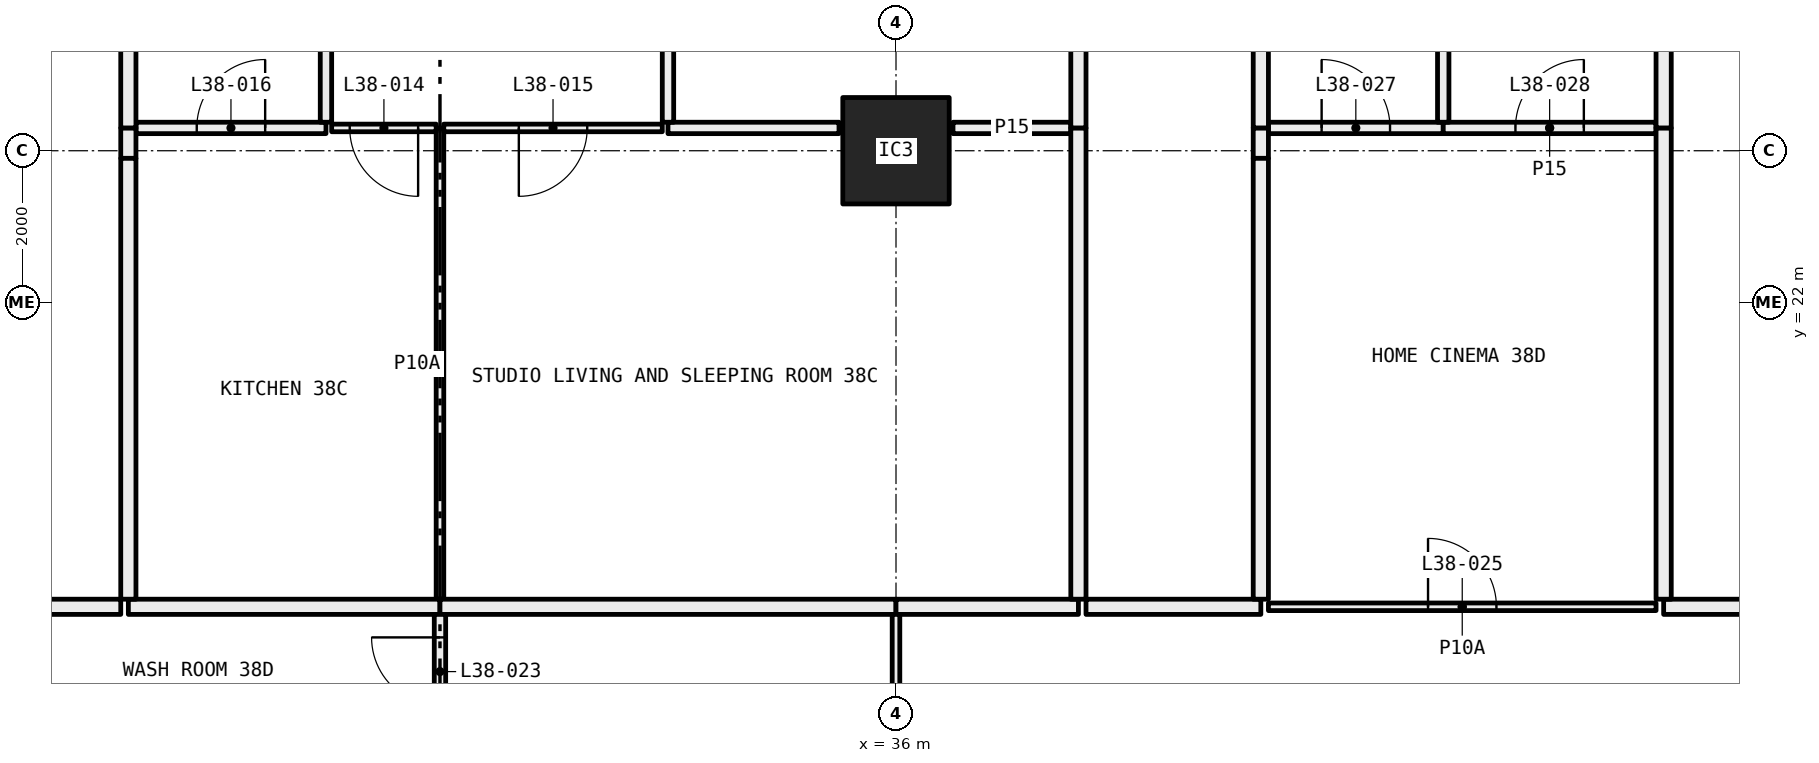
"""IFC4 building model, lengths in metres.
Left out: names, types, materials, properties, quantities, classifications, styles, units other than length and angle.
Written with IfcOpenShell. Run it as: python <this file> out.ifc"""

import sys

from ifc_helpers import new_model, si_unit, direction, frame, frame_2d, origin, origin_2d, place, context, subcontext, project, spatial, rectangle, hollow_rectangle, extrude, element, fill, save


model = new_model("IFC4")
c1 = context("Model", 3, precision=1e-05, world=origin(), true_north=direction((0.0, 1.0)))
c2 = subcontext(c1, "Body", "Model", "MODEL_VIEW")
j1 = project(units=[si_unit("LENGTHUNIT", "METRE"), si_unit("PLANEANGLEUNIT", "RADIAN")], contexts=[c1])
p1 = place(None, origin())
s1 = spatial("IfcSite", under=j1, at=p1, CompositionType="ELEMENT")
p2 = place(p1, origin())
s2 = spatial("IfcBuilding", under=s1, at=p2, CompositionType="ELEMENT")
p3 = place(p2, frame((0.0, 0.0, 144.9)))
s3 = spatial("IfcBuildingStorey", under=s2, at=p3, CompositionType="ELEMENT", Elevation=144.9)
p4 = place(p3, frame((36.0, 24.0, 0.0), z_axis=(0.0, 0.0, 1.0), x_axis=(1.0, 0.0, 0.0)))
e1 = element("IfcColumn", 1, at=p4, inside=s3, PredefinedType="COLUMN", context=c2, shape_type="SweptSolid", body=[
    extrude(hollow_rectangle(XDim=1.4, YDim=1.4, WallThickness=0.06, at=origin_2d()), origin(), (0.0, 0.0, 1.0), 3.05),
])
p5 = place(p3, frame((30.0, 18.1, 0.0), z_axis=(0.0, 0.0, 1.0), x_axis=(0.0, 1.0, 0.0)))
e2 = element("IfcWall", 2, at=p5, inside=s3, PredefinedType="PARTITIONING", context=c2, shape_type="SweptSolid", body=[
    extrude(rectangle(XDim=6.2, YDim=0.1, at=frame_2d((3.1, 0.0))), origin(), (0.0, 0.0, 1.0), 2.45),
])
p6 = place(p3, frame((28.5, 24.3, 0.0), z_axis=(0.0, 0.0, 1.0), x_axis=(-1.0, 0.0, 0.0)))
e3 = element("IfcWall", 3, at=p6, inside=s3, PredefinedType="PARTITIONING", context=c2, shape_type="SweptSolid", body=[
    extrude(rectangle(XDim=2.5, YDim=0.15, at=frame_2d((1.25, 0.0))), origin(), (0.0, 0.0, 1.0), 3.05),
])
p7 = place(p6, frame((0.8, 0.0, 0.0)))
e4 = element("IfcOpeningElement", 4, at=p7, cuts=e3, PredefinedType="OPENING", context=c2, shape_type="SweptSolid", body=[
    extrude(rectangle(XDim=0.9, YDim=2.1, at=frame_2d((0.45, 1.05))), frame((0.0, 0.085, 0.0), z_axis=(0.0, -1.0, 0.0), x_axis=(1.0, 0.0, 0.0)), (0.0, 0.0, 1.0), 0.17),
])
p8 = place(p3, frame((29.95, 24.3, 0.0), z_axis=(0.0, 0.0, 1.0), x_axis=(-1.0, 0.0, 0.0)))
e5 = element("IfcWall", 5, at=p8, inside=s3, PredefinedType="PARTITIONING", context=c2, shape_type="SweptSolid", body=[
    extrude(rectangle(XDim=1.375, YDim=0.1, at=frame_2d((0.688, 0.0))), origin(), (0.0, 0.0, 1.0), 3.05),
])
p9 = place(p8, frame((0.238, 0.0, 0.0)))
e6 = element("IfcOpeningElement", 6, at=p9, cuts=e5, PredefinedType="OPENING", context=c2, shape_type="SweptSolid", body=[
    extrude(rectangle(XDim=0.9, YDim=2.1, at=frame_2d((0.45, 1.05))), frame((0.0, 0.06, 0.0), z_axis=(0.0, -1.0, 0.0), x_axis=(1.0, 0.0, 0.0)), (0.0, 0.0, 1.0), 0.12),
])
p10 = place(p3, frame((25.9, 18.0, 0.0), z_axis=(0.0, 0.0, 1.0), x_axis=(1.0, 0.0, 0.0)))
e7 = element("IfcWall", 7, at=p10, inside=s3, PredefinedType="PARTITIONING", context=c2, shape_type="SweptSolid", body=[
    extrude(rectangle(XDim=4.1, YDim=0.2, at=frame_2d((2.05, 0.0))), origin(), (0.0, 0.0, 1.0), 3.05),
])
p11 = place(p3, frame((25.9, 24.3, 0.0), z_axis=(0.0, 0.0, 1.0), x_axis=(0.0, -1.0, 0.0)))
e8 = element("IfcWall", 8, at=p11, inside=s3, PredefinedType="PARTITIONING", context=c2, shape_type="SweptSolid", body=[
    extrude(rectangle(XDim=0.4, YDim=0.2, at=frame_2d((0.2, 0.0))), origin(), (0.0, 0.0, 1.0), 2.45),
])
p12 = place(p3, frame((25.9, 23.9, 0.0), z_axis=(0.0, 0.0, 1.0), x_axis=(0.0, -1.0, 0.0)))
e9 = element("IfcWall", 9, at=p12, inside=s3, PredefinedType="PARTITIONING", context=c2, shape_type="SweptSolid", body=[
    extrude(rectangle(XDim=5.8, YDim=0.2, at=frame_2d((2.9, 0.0))), origin(), (0.0, 0.0, 1.0), 3.05),
])
p13 = place(p3, frame((32.925, 24.3, 0.0), z_axis=(0.0, 0.0, 1.0), x_axis=(-1.0, 0.0, 0.0)))
e10 = element("IfcWall", 10, at=p13, inside=s3, PredefinedType="PARTITIONING", context=c2, shape_type="SweptSolid", body=[
    extrude(rectangle(XDim=2.875, YDim=0.1, at=frame_2d((1.438, 0.0))), origin(), (0.0, 0.0, 1.0), 3.05),
])
p14 = place(p13, frame((0.988, 0.0, 0.0)))
e11 = element("IfcOpeningElement", 11, at=p14, cuts=e10, PredefinedType="OPENING", context=c2, shape_type="SweptSolid", body=[
    extrude(rectangle(XDim=0.9, YDim=2.1, at=frame_2d((0.45, 1.05))), frame((0.0, 0.06, 0.0), z_axis=(0.0, -1.0, 0.0), x_axis=(1.0, 0.0, 0.0)), (0.0, 0.0, 1.0), 0.12),
])
p15 = place(p3, frame((35.25, 24.3, 0.0), z_axis=(0.0, 0.0, 1.0), x_axis=(-1.0, 0.0, 0.0)))
e12 = element("IfcWall", 12, at=p15, inside=s3, PredefinedType="PARTITIONING", context=c2, shape_type="SweptSolid", body=[
    extrude(rectangle(XDim=2.25, YDim=0.15, at=frame_2d((1.125, 0.0))), origin(), (0.0, 0.0, 1.0), 3.05),
])
p16 = place(p3, frame((38.3, 24.3, 0.0), z_axis=(0.0, 0.0, 1.0), x_axis=(-1.0, 0.0, 0.0)))
e13 = element("IfcWall", 13, at=p16, inside=s3, PredefinedType="PARTITIONING", context=c2, shape_type="SweptSolid", body=[
    extrude(rectangle(XDim=1.55, YDim=0.15, at=frame_2d((0.775, 0.0))), origin(), (0.0, 0.0, 1.0), 3.05),
])
p17 = place(p3, frame((30.0, 18.0, 0.0), z_axis=(0.0, 0.0, 1.0), x_axis=(1.0, 0.0, 0.0)))
e14 = element("IfcWall", 14, at=p17, inside=s3, PredefinedType="PARTITIONING", context=c2, shape_type="SweptSolid", body=[
    extrude(rectangle(XDim=6.0, YDim=0.2, at=frame_2d((3.0, 0.0))), origin(), (0.0, 0.0, 1.0), 2.45),
])
p18 = place(p3, frame((36.0, 18.0, 0.0), z_axis=(0.0, 0.0, 1.0), x_axis=(1.0, 0.0, 0.0)))
e15 = element("IfcWall", 15, at=p18, inside=s3, PredefinedType="PARTITIONING", context=c2, shape_type="SweptSolid", body=[
    extrude(rectangle(XDim=2.4, YDim=0.2, at=frame_2d((1.2, 0.0))), origin(), (0.0, 0.0, 1.0), 2.45),
])
p19 = place(p3, frame((38.4, 18.1, 0.0), z_axis=(0.0, 0.0, 1.0), x_axis=(0.0, 1.0, 0.0)))
e16 = element("IfcWall", 16, at=p19, inside=s3, PredefinedType="PARTITIONING", context=c2, shape_type="SweptSolid", body=[
    extrude(rectangle(XDim=6.2, YDim=0.2, at=frame_2d((3.1, 0.0))), origin(), (0.0, 0.0, 1.0), 2.45),
])
p20 = place(p3, frame((28.5, 24.375, 0.0), z_axis=(0.0, 0.0, 1.0), x_axis=(0.0, 1.0, 0.0)))
e17 = element("IfcWall", 17, at=p20, inside=s3, PredefinedType="PARTITIONING", context=c2, shape_type="SweptSolid", body=[
    extrude(rectangle(XDim=1.927, YDim=0.15, at=frame_2d((0.963, 0.0))), origin(), (0.0, 0.0, 1.0), 3.05),
])
p21 = place(p3, frame((25.9, 26.377, 0.0), z_axis=(0.0, 0.0, 1.0), x_axis=(0.0, -1.0, 0.0)))
e18 = element("IfcWall", 18, at=p21, inside=s3, PredefinedType="PARTITIONING", context=c2, shape_type="SweptSolid", body=[
    extrude(rectangle(XDim=2.077, YDim=0.2, at=frame_2d((1.039, 0.0))), origin(), (0.0, 0.0, 1.0), 3.05),
])
p22 = place(p3, frame((33.0, 24.375, 0.0), z_axis=(0.0, 0.0, 1.0), x_axis=(0.0, 1.0, 0.0)))
e19 = element("IfcWall", 19, at=p22, inside=s3, PredefinedType="PARTITIONING", context=c2, shape_type="SweptSolid", body=[
    extrude(rectangle(XDim=4.325, YDim=0.15, at=frame_2d((2.163, 0.0))), origin(), (0.0, 0.0, 1.0), 3.05),
])
p23 = place(p22, frame((1.712, 0.0, 0.0)))
e20 = element("IfcOpeningElement", 20, at=p23, cuts=e19, PredefinedType="OPENING", context=c2, shape_type="SweptSolid", body=[
    extrude(rectangle(XDim=0.9, YDim=2.1, at=frame_2d((0.45, 1.05))), frame((0.0, 0.085, 0.0), z_axis=(0.0, -1.0, 0.0), x_axis=(1.0, 0.0, 0.0)), (0.0, 0.0, 1.0), 0.17),
])
p24 = place(p3, frame((38.4, 24.3, 0.0), z_axis=(0.0, 0.0, 1.0), x_axis=(0.0, 1.0, 0.0)))
e21 = element("IfcWall", 21, at=p24, inside=s3, PredefinedType="PARTITIONING", context=c2, shape_type="SweptSolid", body=[
    extrude(rectangle(XDim=4.5, YDim=0.2, at=frame_2d((2.25, 0.0))), origin(), (0.0, 0.0, 1.0), 3.05),
])
p25 = place(p3, frame((30.0, 16.395, 0.0), z_axis=(0.0, 0.0, 1.0), x_axis=(0.0, 1.0, 0.0)))
e22 = element("IfcWall", 22, at=p25, inside=s3, PredefinedType="PARTITIONING", context=c2, shape_type="SweptSolid", body=[
    extrude(rectangle(XDim=1.505, YDim=0.15, at=frame_2d((0.752, 0.0))), origin(), (0.0, 0.0, 1.0), 3.05),
])
p26 = place(p25, frame((0.302, 0.0, 0.0)))
e23 = element("IfcOpeningElement", 23, at=p26, cuts=e22, PredefinedType="OPENING", context=c2, shape_type="SweptSolid", body=[
    extrude(rectangle(XDim=0.9, YDim=2.1, at=frame_2d((0.45, 1.05))), frame((0.0, 0.085, 0.0), z_axis=(0.0, -1.0, 0.0), x_axis=(1.0, 0.0, 0.0)), (0.0, 0.0, 1.0), 0.17),
])
p27 = place(p3, frame((25.8, 18.0, 0.0), z_axis=(0.0, 0.0, 1.0), x_axis=(-1.0, 0.0, 0.0)))
e24 = element("IfcWall", 24, at=p27, inside=s3, PredefinedType="PARTITIONING", context=c2, shape_type="SweptSolid", body=[
    extrude(rectangle(XDim=1.7, YDim=0.2, at=frame_2d((0.85, 0.0))), origin(), (0.0, 0.0, 1.0), 3.05),
])
p28 = place(p3, frame((36.0, 12.72, 0.0), z_axis=(0.0, 0.0, 1.0), x_axis=(0.0, 1.0, 0.0)))
e25 = element("IfcWall", 25, at=p28, inside=s3, PredefinedType="PARTITIONING", context=c2, shape_type="SweptSolid", body=[
    extrude(rectangle(XDim=5.18, YDim=0.1, at=frame_2d((2.59, 0.0))), origin(), (0.0, 0.0, 1.0), 2.45),
])
p29 = place(p28, frame((2.14, 0.0, 0.0)))
e26 = element("IfcOpeningElement", 26, at=p29, cuts=e25, PredefinedType="OPENING", context=c2, shape_type="SweptSolid", body=[
    extrude(rectangle(XDim=0.9, YDim=2.1, at=frame_2d((0.45, 1.05))), frame((0.0, 0.06, 0.0), z_axis=(0.0, -1.0, 0.0), x_axis=(1.0, 0.0, 0.0)), (0.0, 0.0, 1.0), 0.12),
])
p30 = place(p3, frame((46.0, 18.0, 0.0), z_axis=(0.0, 0.0, 1.0), x_axis=(-1.0, 0.0, 0.0)))
e27 = element("IfcWall", 27, at=p30, inside=s3, PredefinedType="PARTITIONING", context=c2, shape_type="SweptSolid", body=[
    extrude(rectangle(XDim=5.1, YDim=0.1, at=frame_2d((2.55, 0.0))), origin(), (0.0, 0.0, 1.0), 3.05),
])
p31 = place(p30, frame((2.1, 0.0, 0.0)))
e28 = element("IfcOpeningElement", 28, at=p31, cuts=e27, PredefinedType="OPENING", context=c2, shape_type="SweptSolid", body=[
    extrude(rectangle(XDim=0.9, YDim=2.1, at=frame_2d((0.45, 1.05))), frame((0.0, 0.06, 0.0), z_axis=(0.0, -1.0, 0.0), x_axis=(1.0, 0.0, 0.0)), (0.0, 0.0, 1.0), 0.12),
])
p32 = place(p3, frame((40.8, 18.0, 0.0), z_axis=(0.0, 0.0, 1.0), x_axis=(-1.0, 0.0, 0.0)))
e29 = element("IfcWall", 29, at=p32, inside=s3, PredefinedType="PARTITIONING", context=c2, shape_type="SweptSolid", body=[
    extrude(rectangle(XDim=2.3, YDim=0.2, at=frame_2d((1.15, 0.0))), origin(), (0.0, 0.0, 1.0), 3.05),
])
p33 = place(p3, frame((48.0, 18.0, 0.0), z_axis=(0.0, 0.0, 1.0), x_axis=(-1.0, 0.0, 0.0)))
e30 = element("IfcWall", 30, at=p33, inside=s3, PredefinedType="PARTITIONING", context=c2, shape_type="SweptSolid", body=[
    extrude(rectangle(XDim=1.9, YDim=0.2, at=frame_2d((0.95, 0.0))), origin(), (0.0, 0.0, 1.0), 3.05),
])
p34 = place(p3, frame((43.2, 24.3, 0.0), z_axis=(0.0, 0.0, 1.0), x_axis=(-1.0, 0.0, 0.0)))
e31 = element("IfcWall", 31, at=p34, inside=s3, PredefinedType="PARTITIONING", context=c2, shape_type="SweptSolid", body=[
    extrude(rectangle(XDim=2.3, YDim=0.15, at=frame_2d((1.15, 0.0))), origin(), (0.0, 0.0, 1.0), 3.05),
])
p35 = place(p34, frame((0.7, 0.0, 0.0)))
e32 = element("IfcOpeningElement", 32, at=p35, cuts=e31, PredefinedType="OPENING", context=c2, shape_type="SweptSolid", body=[
    extrude(rectangle(XDim=0.9, YDim=2.1, at=frame_2d((0.45, 1.05))), frame((0.0, 0.085, 0.0), z_axis=(0.0, -1.0, 0.0), x_axis=(1.0, 0.0, 0.0)), (0.0, 0.0, 1.0), 0.17),
])
p36 = place(p3, frame((46.0, 24.3, 0.0), z_axis=(0.0, 0.0, 1.0), x_axis=(-1.0, 0.0, 0.0)))
e33 = element("IfcWall", 33, at=p36, inside=s3, PredefinedType="PARTITIONING", context=c2, shape_type="SweptSolid", body=[
    extrude(rectangle(XDim=2.8, YDim=0.15, at=frame_2d((1.4, 0.0))), origin(), (0.0, 0.0, 1.0), 3.05),
])
p37 = place(p36, frame((0.95, 0.0, 0.0)))
e34 = element("IfcOpeningElement", 34, at=p37, cuts=e33, PredefinedType="OPENING", context=c2, shape_type="SweptSolid", body=[
    extrude(rectangle(XDim=0.9, YDim=2.1, at=frame_2d((0.45, 1.05))), frame((0.0, 0.085, 0.0), z_axis=(0.0, -1.0, 0.0), x_axis=(1.0, 0.0, 0.0)), (0.0, 0.0, 1.0), 0.17),
])
p38 = place(p3, frame((40.8, 24.3, 0.0), z_axis=(0.0, 0.0, 1.0), x_axis=(0.0, -1.0, 0.0)))
e35 = element("IfcWall", 35, at=p38, inside=s3, PredefinedType="PARTITIONING", context=c2, shape_type="SweptSolid", body=[
    extrude(rectangle(XDim=0.4, YDim=0.2, at=frame_2d((0.2, 0.0))), origin(), (0.0, 0.0, 1.0), 2.45),
])
p39 = place(p3, frame((40.8, 23.9, 0.0), z_axis=(0.0, 0.0, 1.0), x_axis=(0.0, -1.0, 0.0)))
e36 = element("IfcWall", 36, at=p39, inside=s3, PredefinedType="PARTITIONING", context=c2, shape_type="SweptSolid", body=[
    extrude(rectangle(XDim=5.8, YDim=0.2, at=frame_2d((2.9, 0.0))), origin(), (0.0, 0.0, 1.0), 3.05),
])
p40 = place(p3, frame((46.1, 18.1, 0.0), z_axis=(0.0, 0.0, 1.0), x_axis=(0.0, 1.0, 0.0)))
e37 = element("IfcWall", 37, at=p40, inside=s3, PredefinedType="PARTITIONING", context=c2, shape_type="SweptSolid", body=[
    extrude(rectangle(XDim=6.2, YDim=0.2, at=frame_2d((3.1, 0.0))), origin(), (0.0, 0.0, 1.0), 2.45),
])
p41 = place(p3, frame((43.2, 24.375, 0.0), z_axis=(0.0, 0.0, 1.0), x_axis=(0.0, 1.0, 0.0)))
e38 = element("IfcWall", 38, at=p41, inside=s3, PredefinedType="PARTITIONING", context=c2, shape_type="SweptSolid", body=[
    extrude(rectangle(XDim=2.1, YDim=0.15, at=frame_2d((1.05, 0.0))), origin(), (0.0, 0.0, 1.0), 3.05),
])
p42 = place(p3, frame((40.8, 26.55, 0.0), z_axis=(0.0, 0.0, 1.0), x_axis=(0.0, -1.0, 0.0)))
e39 = element("IfcWall", 39, at=p42, inside=s3, PredefinedType="PARTITIONING", context=c2, shape_type="SweptSolid", body=[
    extrude(rectangle(XDim=2.25, YDim=0.2, at=frame_2d((1.125, 0.0))), origin(), (0.0, 0.0, 1.0), 3.05),
])
p43 = place(p3, frame((46.1, 24.3, 0.0), z_axis=(0.0, 0.0, 1.0), x_axis=(0.0, 1.0, 0.0)))
e40 = element("IfcWall", 40, at=p43, inside=s3, PredefinedType="PARTITIONING", context=c2, shape_type="SweptSolid", body=[
    extrude(rectangle(XDim=4.5, YDim=0.2, at=frame_2d((2.25, 0.0))), origin(), (0.0, 0.0, 1.0), 3.05),
])
p44 = place(p9, origin())
e41 = element("IfcDoor", 41, at=p44, inside=s3, OperationType="SINGLE_SWING_RIGHT", PredefinedType="DOOR", context=c2, shape_type="SweptSolid", body=[
    extrude(rectangle(XDim=0.9, YDim=2.1, at=frame_2d((0.45, 1.05))), frame((0.0, 0.025, 0.0), z_axis=(0.0, -1.0, 0.0), x_axis=(1.0, 0.0, 0.0)), (0.0, 0.0, 1.0), 0.05),
])
fill(e6, e41)
p45 = place(p14, origin())
e42 = element("IfcDoor", 42, at=p45, inside=s3, OperationType="SINGLE_SWING_LEFT", PredefinedType="DOOR", context=c2, shape_type="SweptSolid", body=[
    extrude(rectangle(XDim=0.9, YDim=2.1, at=frame_2d((0.45, 1.05))), frame((0.0, 0.025, 0.0), z_axis=(0.0, -1.0, 0.0), x_axis=(1.0, 0.0, 0.0)), (0.0, 0.0, 1.0), 0.05),
])
fill(e11, e42)
p46 = place(p7, frame((0.9, 0.0, 0.0), x_axis=(-1.0, 0.0, 0.0)))
e43 = element("IfcDoor", 43, at=p46, inside=s3, OperationType="SINGLE_SWING_LEFT", PredefinedType="DOOR", context=c2, shape_type="SweptSolid", body=[
    extrude(rectangle(XDim=0.9, YDim=2.1, at=frame_2d((0.45, 1.05))), frame((0.0, 0.025, 0.0), z_axis=(0.0, -1.0, 0.0), x_axis=(1.0, 0.0, 0.0)), (0.0, 0.0, 1.0), 0.05),
])
fill(e4, e43)
p47 = place(p26, origin())
e44 = element("IfcDoor", 44, at=p47, inside=s3, OperationType="SINGLE_SWING_LEFT", PredefinedType="DOOR", context=c2, shape_type="SweptSolid", body=[
    extrude(rectangle(XDim=0.9, YDim=2.1, at=frame_2d((0.45, 1.05))), frame((0.0, 0.025, 0.0), z_axis=(0.0, -1.0, 0.0), x_axis=(1.0, 0.0, 0.0)), (0.0, 0.0, 1.0), 0.05),
])
fill(e23, e44)
p48 = place(p31, frame((0.9, 0.0, 0.0), x_axis=(-1.0, 0.0, 0.0)))
e45 = element("IfcDoor", 45, at=p48, inside=s3, OperationType="SINGLE_SWING_RIGHT", PredefinedType="DOOR", context=c2, shape_type="SweptSolid", body=[
    extrude(rectangle(XDim=0.9, YDim=2.1, at=frame_2d((0.45, 1.05))), frame((0.0, 0.025, 0.0), z_axis=(0.0, -1.0, 0.0), x_axis=(1.0, 0.0, 0.0)), (0.0, 0.0, 1.0), 0.05),
])
fill(e28, e45)
p49 = place(p35, frame((0.9, 0.0, 0.0), x_axis=(-1.0, 0.0, 0.0)))
e46 = element("IfcDoor", 46, at=p49, inside=s3, OperationType="SINGLE_SWING_RIGHT", PredefinedType="DOOR", context=c2, shape_type="SweptSolid", body=[
    extrude(rectangle(XDim=0.9, YDim=2.1, at=frame_2d((0.45, 1.05))), frame((0.0, 0.025, 0.0), z_axis=(0.0, -1.0, 0.0), x_axis=(1.0, 0.0, 0.0)), (0.0, 0.0, 1.0), 0.05),
])
fill(e32, e46)
p50 = place(p37, frame((0.9, 0.0, 0.0), x_axis=(-1.0, 0.0, 0.0)))
e47 = element("IfcDoor", 47, at=p50, inside=s3, OperationType="SINGLE_SWING_LEFT", PredefinedType="DOOR", context=c2, shape_type="SweptSolid", body=[
    extrude(rectangle(XDim=0.9, YDim=2.1, at=frame_2d((0.45, 1.05))), frame((0.0, 0.025, 0.0), z_axis=(0.0, -1.0, 0.0), x_axis=(1.0, 0.0, 0.0)), (0.0, 0.0, 1.0), 0.05),
])
fill(e34, e47)
save(model, sys.argv[1])
